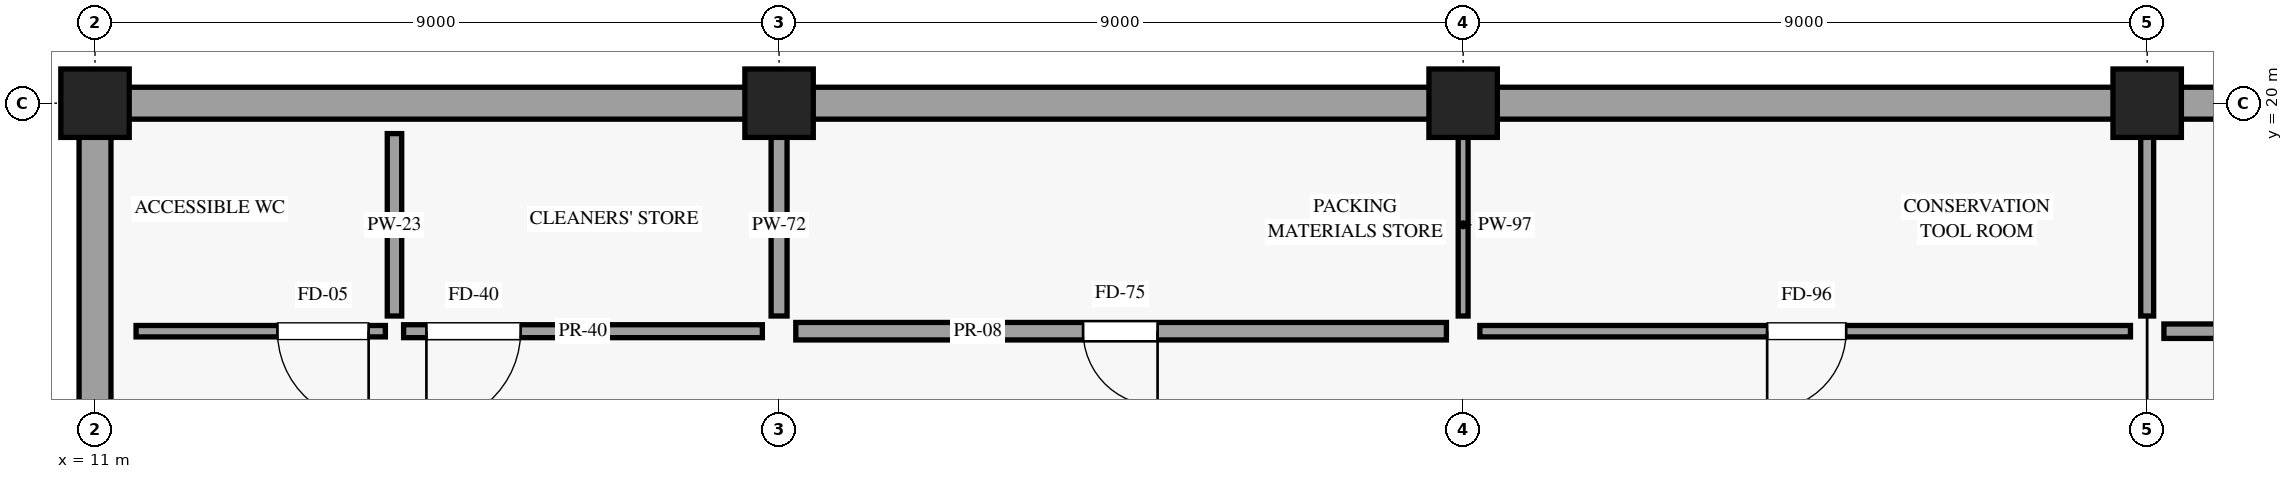
"""IFC4 building model, lengths in metres.
Left out: names, types, materials, properties, quantities, classifications, styles, units other than length and angle.
Written with IfcOpenShell. Run it as: python <this file> out.ifc"""

import sys

from ifc_helpers import new_model, si_unit, direction, frame, frame_2d, origin, origin_2d, place, context, subcontext, project, spatial, rectangle, extrude, element, fill, save


model = new_model("IFC4")
c1 = context("Model", 3, precision=1e-05, world=origin(), true_north=direction((0.0, 1.0)))
c2 = subcontext(c1, "Body", "Model", "MODEL_VIEW")
j1 = project(units=[si_unit("LENGTHUNIT", "METRE"), si_unit("PLANEANGLEUNIT", "RADIAN")], contexts=[c1])
p1 = place(None, origin())
s1 = spatial("IfcSite", under=j1, at=p1, CompositionType="ELEMENT")
p2 = place(p1, origin())
s2 = spatial("IfcBuilding", under=s1, at=p2, CompositionType="ELEMENT")
p3 = place(p2, frame((0.0, 0.0, -4.8)))
s3 = spatial("IfcBuildingStorey", under=s2, at=p3, CompositionType="ELEMENT", Elevation=-4.8)
for number, where, z_axis, x_axis in (
    (1, (11.0, 20.0, 0.0), (0.0, 0.0, 1.0), (1.0, 0.0, 0.0)),
    (2, (20.0, 20.0, 0.0), (0.0, 0.0, 1.0), (1.0, 0.0, 0.0)),
    (3, (29.0, 20.0, 0.0), (0.0, 0.0, 1.0), (1.0, 0.0, 0.0)),
    (4, (38.0, 20.0, 0.0), (0.0, 0.0, 1.0), (1.0, 0.0, 0.0)),
):
    element("IfcColumn", number, at=place(p3, frame(where, z_axis=z_axis, x_axis=x_axis)), inside=s3, PredefinedType="COLUMN", context=c2, shape_type="SweptSolid", body=[
        extrude(rectangle(XDim=0.9, YDim=0.9, at=origin_2d()), origin(), (0.0, 0.0, 1.0), 4.8),
    ])
p4 = place(p3, frame((10.79, 20.0, 0.0), z_axis=(0.0, 0.0, 1.0), x_axis=(1.0, 0.0, 0.0)))
e5 = element("IfcWall", 5, at=p4, inside=s3, PredefinedType="SOLIDWALL", context=c2, shape_type="SweptSolid", body=[
    extrude(rectangle(XDim=45.42, YDim=0.42, at=frame_2d((22.71, 0.0))), origin(), (0.0, 0.0, 1.0), 3.215),
])
p5 = place(p3, frame((11.0, 2.0, 0.0), z_axis=(0.0, 0.0, 1.0), x_axis=(0.0, 1.0, 0.0)))
e6 = element("IfcWall", 6, at=p5, inside=s3, PredefinedType="SOLIDWALL", context=c2, shape_type="SweptSolid", body=[
    extrude(rectangle(XDim=18.0, YDim=0.42, at=frame_2d((9.0, 0.0))), origin(), (0.0, 0.0, 1.0), 3.415),
])
p6 = place(p3, frame((11.54, 17.0, 0.0), z_axis=(0.0, 0.0, 1.0), x_axis=(1.0, 0.0, 0.0)))
e7 = element("IfcWall", 7, at=p6, inside=s3, PredefinedType="PARTITIONING", context=c2, shape_type="SweptSolid", body=[
    extrude(rectangle(XDim=3.28, YDim=0.15, at=frame_2d((1.64, 0.0))), origin(), (0.0, 0.0, 1.0), 4.48),
])
p7 = place(p6, frame((3.06, 0.0, 0.0), z_axis=(0.0, 0.0, 1.0), x_axis=(-1.0, 0.0, 0.0)))
e8 = element("IfcOpeningElement", 8, at=p7, cuts=e7, PredefinedType="OPENING", context=c2, shape_type="SweptSolid", body=[
    extrude(rectangle(XDim=1.2, YDim=2.3, at=frame_2d((0.6, 1.15))), frame((0.0, 0.085, 0.0), z_axis=(0.0, -1.0, 0.0), x_axis=(1.0, 0.0, 0.0)), (0.0, 0.0, 1.0), 0.17),
])
p8 = place(p3, frame((15.06, 17.0, 0.0), z_axis=(0.0, 0.0, 1.0), x_axis=(1.0, 0.0, 0.0)))
e9 = element("IfcWall", 9, at=p8, inside=s3, PredefinedType="PARTITIONING", context=c2, shape_type="SweptSolid", body=[
    extrude(rectangle(XDim=4.72, YDim=0.17, at=frame_2d((2.36, 0.0))), origin(), (0.0, 0.0, 1.0), 3.415),
])
p9 = place(p8, frame((1.54, 0.0, 0.0), z_axis=(0.0, 0.0, 1.0), x_axis=(-1.0, 0.0, 0.0)))
e10 = element("IfcOpeningElement", 10, at=p9, cuts=e9, PredefinedType="OPENING", context=c2, shape_type="SweptSolid", body=[
    extrude(rectangle(XDim=1.24, YDim=2.32, at=frame_2d((0.62, 1.16))), frame((0.0, 0.095, 0.0), z_axis=(0.0, -1.0, 0.0), x_axis=(1.0, 0.0, 0.0)), (0.0, 0.0, 1.0), 0.19),
])
p10 = place(p3, frame((14.94, 17.2, 0.0), z_axis=(0.0, 0.0, 1.0), x_axis=(0.0, 1.0, 0.0)))
e11 = element("IfcWall", 11, at=p10, inside=s3, PredefinedType="PARTITIONING", context=c2, shape_type="SweptSolid", body=[
    extrude(rectangle(XDim=2.4, YDim=0.19, at=frame_2d((1.2, 0.0))), origin(), (0.0, 0.0, 1.0), 3.415),
])
p11 = place(p3, frame((20.0, 17.2, 0.0), z_axis=(0.0, 0.0, 1.0), x_axis=(0.0, 1.0, 0.0)))
e12 = element("IfcWall", 12, at=p11, inside=s3, PredefinedType="PARTITIONING", context=c2, shape_type="SweptSolid", body=[
    extrude(rectangle(XDim=2.4, YDim=0.21, at=frame_2d((1.2, 0.0))), origin(), (0.0, 0.0, 1.0), 3.415),
])
p12 = place(p3, frame((20.22, 17.0, 0.0), z_axis=(0.0, 0.0, 1.0), x_axis=(1.0, 0.0, 0.0)))
e13 = element("IfcWall", 13, at=p12, inside=s3, PredefinedType="PARTITIONING", context=c2, shape_type="SweptSolid", body=[
    extrude(rectangle(XDim=8.56, YDim=0.23, at=frame_2d((4.28, 0.0))), origin(), (0.0, 0.0, 1.0), 3.415),
])
p13 = place(p12, frame((4.76, 0.0, 0.0), z_axis=(0.0, 0.0, 1.0), x_axis=(-1.0, 0.0, 0.0)))
e14 = element("IfcOpeningElement", 14, at=p13, cuts=e13, PredefinedType="OPENING", context=c2, shape_type="SweptSolid", body=[
    extrude(rectangle(XDim=0.98, YDim=2.18, at=frame_2d((0.49, 1.09))), frame((0.0, 0.125, 0.0), z_axis=(0.0, -1.0, 0.0), x_axis=(1.0, 0.0, 0.0)), (0.0, 0.0, 1.0), 0.25),
])
p14 = place(p3, frame((29.0, 17.2, 0.0), z_axis=(0.0, 0.0, 1.0), x_axis=(0.0, 1.0, 0.0)))
e15 = element("IfcWall", 15, at=p14, inside=s3, PredefinedType="PARTITIONING", context=c2, shape_type="SweptSolid", body=[
    extrude(rectangle(XDim=2.4, YDim=0.13, at=frame_2d((1.2, 0.0))), origin(), (0.0, 0.0, 1.0), 3.415),
])
p15 = place(p3, frame((29.22, 17.0, 0.0), z_axis=(0.0, 0.0, 1.0), x_axis=(1.0, 0.0, 0.0)))
e16 = element("IfcWall", 16, at=p15, inside=s3, PredefinedType="PARTITIONING", context=c2, shape_type="SweptSolid", body=[
    extrude(rectangle(XDim=8.56, YDim=0.15, at=frame_2d((4.28, 0.0))), origin(), (0.0, 0.0, 1.0), 3.415),
])
p16 = place(p15, frame((4.82, 0.0, 0.0), z_axis=(0.0, 0.0, 1.0), x_axis=(-1.0, 0.0, 0.0)))
e17 = element("IfcOpeningElement", 17, at=p16, cuts=e16, PredefinedType="OPENING", context=c2, shape_type="SweptSolid", body=[
    extrude(rectangle(XDim=1.04, YDim=2.22, at=frame_2d((0.52, 1.11))), frame((0.0, 0.085, 0.0), z_axis=(0.0, -1.0, 0.0), x_axis=(1.0, 0.0, 0.0)), (0.0, 0.0, 1.0), 0.17),
])
p17 = place(p3, frame((38.0, 17.2, 0.0), z_axis=(0.0, 0.0, 1.0), x_axis=(0.0, 1.0, 0.0)))
e18 = element("IfcWall", 18, at=p17, inside=s3, PredefinedType="PARTITIONING", context=c2, shape_type="SweptSolid", body=[
    extrude(rectangle(XDim=2.4, YDim=0.17, at=frame_2d((1.2, 0.0))), origin(), (0.0, 0.0, 1.0), 3.415),
])
p18 = place(p3, frame((38.22, 17.0, 0.0), z_axis=(0.0, 0.0, 1.0), x_axis=(1.0, 0.0, 0.0)))
e19 = element("IfcWall", 19, at=p18, inside=s3, PredefinedType="PARTITIONING", context=c2, shape_type="SweptSolid", body=[
    extrude(rectangle(XDim=17.24, YDim=0.19, at=frame_2d((8.62, 0.0))), origin(), (0.0, 0.0, 1.0), 3.415),
])
p19 = place(p18, frame((13.852, 0.0, 0.0), z_axis=(0.0, 0.0, 1.0), x_axis=(-1.0, 0.0, 0.0)))
e20 = element("IfcOpeningElement", 20, at=p19, cuts=e19, PredefinedType="OPENING", context=c2, shape_type="SweptSolid", body=[
    extrude(rectangle(XDim=1.12, YDim=2.26, at=frame_2d((0.56, 1.13))), frame((0.0, 0.105, 0.0), z_axis=(0.0, -1.0, 0.0), x_axis=(1.0, 0.0, 0.0)), (0.0, 0.0, 1.0), 0.21),
])
p20 = place(p7, origin())
e21 = element("IfcDoor", 21, at=p20, inside=s3, OperationType="SINGLE_SWING_LEFT", PredefinedType="DOOR", context=c2, shape_type="SweptSolid", body=[
    extrude(rectangle(XDim=1.2, YDim=2.3, at=frame_2d((0.6, 1.15))), frame((0.0, 0.025, 0.0), z_axis=(0.0, -1.0, 0.0), x_axis=(1.0, 0.0, 0.0)), (0.0, 0.0, 1.0), 0.05),
])
fill(e8, e21)
p21 = place(p9, origin())
e22 = element("IfcDoor", 22, at=p21, inside=s3, OperationType="SINGLE_SWING_RIGHT", PredefinedType="DOOR", context=c2, shape_type="SweptSolid", body=[
    extrude(rectangle(XDim=1.24, YDim=2.32, at=frame_2d((0.62, 1.16))), frame((0.0, 0.025, 0.0), z_axis=(0.0, -1.0, 0.0), x_axis=(1.0, 0.0, 0.0)), (0.0, 0.0, 1.0), 0.05),
])
fill(e10, e22)
p22 = place(p13, origin())
e23 = element("IfcDoor", 23, at=p22, inside=s3, OperationType="SINGLE_SWING_LEFT", PredefinedType="DOOR", context=c2, shape_type="SweptSolid", body=[
    extrude(rectangle(XDim=0.98, YDim=2.18, at=frame_2d((0.49, 1.09))), frame((0.0, 0.025, 0.0), z_axis=(0.0, -1.0, 0.0), x_axis=(1.0, 0.0, 0.0)), (0.0, 0.0, 1.0), 0.05),
])
fill(e14, e23)
p23 = place(p16, origin())
e24 = element("IfcDoor", 24, at=p23, inside=s3, OperationType="SINGLE_SWING_RIGHT", PredefinedType="DOOR", context=c2, shape_type="SweptSolid", body=[
    extrude(rectangle(XDim=1.04, YDim=2.22, at=frame_2d((0.52, 1.11))), frame((0.0, 0.025, 0.0), z_axis=(0.0, -1.0, 0.0), x_axis=(1.0, 0.0, 0.0)), (0.0, 0.0, 1.0), 0.05),
])
fill(e17, e24)
save(model, sys.argv[1])
